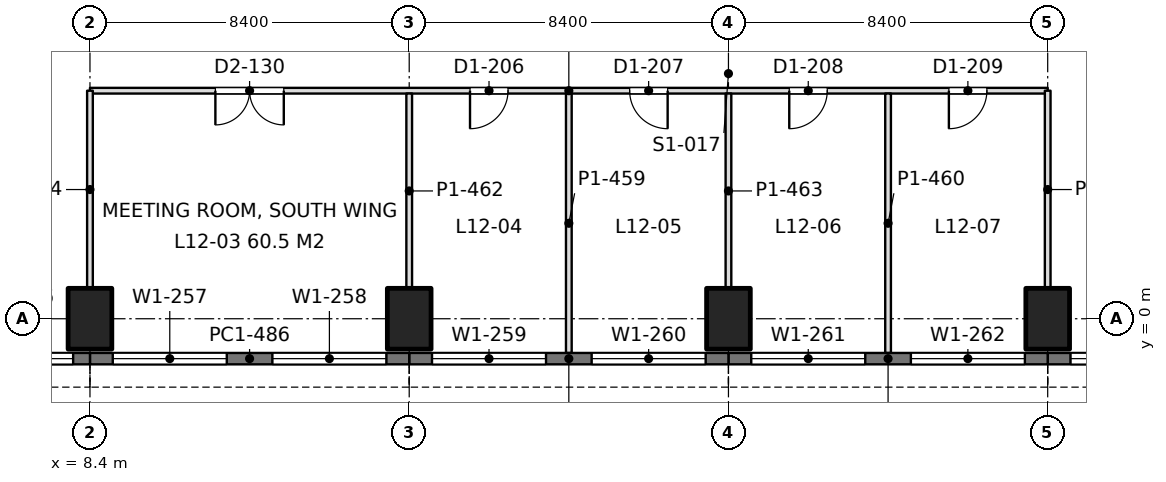
"""IFC4 building model, lengths in metres.
Left out: names, types, materials, properties, quantities, classifications, styles, units other than length and angle.
Written with IfcOpenShell. Run it as: python <this file> out.ifc"""

import sys

from ifc_helpers import new_model, si_unit, direction, frame, frame_2d, origin, origin_2d, place, context, subcontext, project, spatial, rectangle, extrude, element, fill, save


model = new_model("IFC4")
c1 = context("Model", 3, precision=1e-05, world=origin(), true_north=direction((0.0, 1.0)))
c2 = subcontext(c1, "Body", "Model", "MODEL_VIEW")
j1 = project(units=[si_unit("LENGTHUNIT", "METRE"), si_unit("PLANEANGLEUNIT", "RADIAN")], contexts=[c1])
p1 = place(None, origin())
s1 = spatial("IfcSite", under=j1, at=p1, CompositionType="ELEMENT")
p2 = place(p1, origin())
s2 = spatial("IfcBuilding", under=s1, at=p2, CompositionType="ELEMENT")
p3 = place(p2, frame((0.0, 0.0, 54.9)))
s3 = spatial("IfcBuildingStorey", under=s2, at=p3, CompositionType="ELEMENT", Elevation=54.9)
for number, where, z_axis, x_axis in (
    (1, (8.4, 0.0, 0.0), (0.0, 0.0, 1.0), (1.0, 0.0, 0.0)),
    (2, (16.8, 0.0, 0.0), (0.0, 0.0, 1.0), (1.0, 0.0, 0.0)),
    (3, (25.2, 0.0, 0.0), (0.0, 0.0, 1.0), (1.0, 0.0, 0.0)),
    (4, (33.6, 0.0, 0.0), (0.0, 0.0, 1.0), (1.0, 0.0, 0.0)),
):
    element("IfcColumn", number, at=place(p3, frame(where, z_axis=z_axis, x_axis=x_axis)), inside=s3, PredefinedType="COLUMN", context=c2, shape_type="SweptSolid", body=[
        extrude(rectangle(XDim=1.15, YDim=1.6, at=origin_2d()), origin(), (0.0, 0.0, 1.0), 4.5),
    ])
p4 = place(p3, frame((42.0, -1.05, 0.0), z_axis=(0.0, 0.0, 1.0), x_axis=(-1.0, 0.0, 0.0)))
e5 = element("IfcWall", 5, at=p4, inside=s3, PredefinedType="SOLIDWALL", context=c2, shape_type="SweptSolid", body=[
    extrude(rectangle(XDim=8.4, YDim=0.3, at=frame_2d((4.2, 0.0))), origin(), (0.0, 0.0, 1.0), 4.34),
])
p5 = place(p4, frame((0.6, 0.0, 0.9)))
e6 = element("IfcOpeningElement", 6, at=p5, cuts=e5, PredefinedType="OPENING", context=c2, shape_type="SweptSolid", body=[
    extrude(rectangle(XDim=3.0, YDim=1.9, at=frame_2d((1.5, 0.95))), frame((0.0, 0.16, 0.0), z_axis=(0.0, -1.0, 0.0), x_axis=(1.0, 0.0, 0.0)), (0.0, 0.0, 1.0), 0.32),
])
p6 = place(p4, frame((4.8, 0.0, 0.9)))
e7 = element("IfcOpeningElement", 7, at=p6, cuts=e5, PredefinedType="OPENING", context=c2, shape_type="SweptSolid", body=[
    extrude(rectangle(XDim=3.0, YDim=1.9, at=frame_2d((1.5, 0.95))), frame((0.0, 0.16, 0.0), z_axis=(0.0, -1.0, 0.0), x_axis=(1.0, 0.0, 0.0)), (0.0, 0.0, 1.0), 0.32),
])
p7 = place(p3, frame((33.6, -1.05, 0.0), z_axis=(0.0, 0.0, 1.0), x_axis=(-1.0, 0.0, 0.0)))
e8 = element("IfcWall", 8, at=p7, inside=s3, PredefinedType="SOLIDWALL", context=c2, shape_type="SweptSolid", body=[
    extrude(rectangle(XDim=8.4, YDim=0.3, at=frame_2d((4.2, 0.0))), origin(), (0.0, 0.0, 1.0), 4.34),
])
p8 = place(p7, frame((0.6, 0.0, 0.9)))
e9 = element("IfcOpeningElement", 9, at=p8, cuts=e8, PredefinedType="OPENING", context=c2, shape_type="SweptSolid", body=[
    extrude(rectangle(XDim=3.0, YDim=1.9, at=frame_2d((1.5, 0.95))), frame((0.0, 0.16, 0.0), z_axis=(0.0, -1.0, 0.0), x_axis=(1.0, 0.0, 0.0)), (0.0, 0.0, 1.0), 0.32),
])
p9 = place(p7, frame((4.8, 0.0, 0.9)))
e10 = element("IfcOpeningElement", 10, at=p9, cuts=e8, PredefinedType="OPENING", context=c2, shape_type="SweptSolid", body=[
    extrude(rectangle(XDim=3.0, YDim=1.9, at=frame_2d((1.5, 0.95))), frame((0.0, 0.16, 0.0), z_axis=(0.0, -1.0, 0.0), x_axis=(1.0, 0.0, 0.0)), (0.0, 0.0, 1.0), 0.32),
])
p10 = place(p3, frame((25.2, -1.05, 0.0), z_axis=(0.0, 0.0, 1.0), x_axis=(-1.0, 0.0, 0.0)))
e11 = element("IfcWall", 11, at=p10, inside=s3, PredefinedType="SOLIDWALL", context=c2, shape_type="SweptSolid", body=[
    extrude(rectangle(XDim=8.4, YDim=0.3, at=frame_2d((4.2, 0.0))), origin(), (0.0, 0.0, 1.0), 4.34),
])
p11 = place(p10, frame((0.6, 0.0, 0.9)))
e12 = element("IfcOpeningElement", 12, at=p11, cuts=e11, PredefinedType="OPENING", context=c2, shape_type="SweptSolid", body=[
    extrude(rectangle(XDim=3.0, YDim=1.9, at=frame_2d((1.5, 0.95))), frame((0.0, 0.16, 0.0), z_axis=(0.0, -1.0, 0.0), x_axis=(1.0, 0.0, 0.0)), (0.0, 0.0, 1.0), 0.32),
])
p12 = place(p10, frame((4.8, 0.0, 0.9)))
e13 = element("IfcOpeningElement", 13, at=p12, cuts=e11, PredefinedType="OPENING", context=c2, shape_type="SweptSolid", body=[
    extrude(rectangle(XDim=3.0, YDim=1.9, at=frame_2d((1.5, 0.95))), frame((0.0, 0.16, 0.0), z_axis=(0.0, -1.0, 0.0), x_axis=(1.0, 0.0, 0.0)), (0.0, 0.0, 1.0), 0.32),
])
p13 = place(p3, frame((16.8, -1.05, 0.0), z_axis=(0.0, 0.0, 1.0), x_axis=(-1.0, 0.0, 0.0)))
e14 = element("IfcWall", 14, at=p13, inside=s3, PredefinedType="SOLIDWALL", context=c2, shape_type="SweptSolid", body=[
    extrude(rectangle(XDim=8.4, YDim=0.3, at=frame_2d((4.2, 0.0))), origin(), (0.0, 0.0, 1.0), 4.34),
])
p14 = place(p13, frame((0.6, 0.0, 0.9)))
e15 = element("IfcOpeningElement", 15, at=p14, cuts=e14, PredefinedType="OPENING", context=c2, shape_type="SweptSolid", body=[
    extrude(rectangle(XDim=3.0, YDim=1.9, at=frame_2d((1.5, 0.95))), frame((0.0, 0.16, 0.0), z_axis=(0.0, -1.0, 0.0), x_axis=(1.0, 0.0, 0.0)), (0.0, 0.0, 1.0), 0.32),
])
p15 = place(p13, frame((4.8, 0.0, 0.9)))
e16 = element("IfcOpeningElement", 16, at=p15, cuts=e14, PredefinedType="OPENING", context=c2, shape_type="SweptSolid", body=[
    extrude(rectangle(XDim=3.0, YDim=1.9, at=frame_2d((1.5, 0.95))), frame((0.0, 0.16, 0.0), z_axis=(0.0, -1.0, 0.0), x_axis=(1.0, 0.0, 0.0)), (0.0, 0.0, 1.0), 0.32),
])
p16 = place(p3, frame((8.4, -1.05, 0.0), z_axis=(0.0, 0.0, 1.0), x_axis=(-1.0, 0.0, 0.0)))
e17 = element("IfcWall", 17, at=p16, inside=s3, PredefinedType="SOLIDWALL", context=c2, shape_type="SweptSolid", body=[
    extrude(rectangle(XDim=8.085, YDim=0.3, at=frame_2d((4.042, 0.0))), origin(), (0.0, 0.0, 1.0), 4.34),
])
p17 = place(p16, frame((0.443, 0.0, 0.9)))
e18 = element("IfcOpeningElement", 18, at=p17, cuts=e17, PredefinedType="OPENING", context=c2, shape_type="SweptSolid", body=[
    extrude(rectangle(XDim=3.0, YDim=1.9, at=frame_2d((1.5, 0.95))), frame((0.0, 0.16, 0.0), z_axis=(0.0, -1.0, 0.0), x_axis=(1.0, 0.0, 0.0)), (0.0, 0.0, 1.0), 0.32),
])
p18 = place(p16, frame((4.643, 0.0, 0.9)))
e19 = element("IfcOpeningElement", 19, at=p18, cuts=e17, PredefinedType="OPENING", context=c2, shape_type="SweptSolid", body=[
    extrude(rectangle(XDim=3.0, YDim=1.9, at=frame_2d((1.5, 0.95))), frame((0.0, 0.16, 0.0), z_axis=(0.0, -1.0, 0.0), x_axis=(1.0, 0.0, 0.0)), (0.0, 0.0, 1.0), 0.32),
])
p19 = place(p3, frame((8.4, 6.0, 0.0), z_axis=(0.0, 0.0, 1.0), x_axis=(1.0, 0.0, 0.0)))
e20 = element("IfcWall", 20, at=p19, inside=s3, PredefinedType="PARTITIONING", context=c2, shape_type="SweptSolid", body=[
    extrude(rectangle(XDim=25.2, YDim=0.15, at=frame_2d((12.6, 0.0))), origin(), (0.0, 0.0, 1.0), 3.74),
])
p20 = place(p19, frame((3.3, 0.0, 0.0)))
e21 = element("IfcOpeningElement", 21, at=p20, cuts=e20, PredefinedType="OPENING", context=c2, shape_type="SweptSolid", body=[
    extrude(rectangle(XDim=1.8, YDim=2.2, at=frame_2d((0.9, 1.1))), frame((0.0, 0.085, 0.0), z_axis=(0.0, -1.0, 0.0), x_axis=(1.0, 0.0, 0.0)), (0.0, 0.0, 1.0), 0.17),
])
p21 = place(p19, frame((10.0, 0.0, 0.0)))
e22 = element("IfcOpeningElement", 22, at=p21, cuts=e20, PredefinedType="OPENING", context=c2, shape_type="SweptSolid", body=[
    extrude(rectangle(XDim=1.0, YDim=2.2, at=frame_2d((0.5, 1.1))), frame((0.0, 0.085, 0.0), z_axis=(0.0, -1.0, 0.0), x_axis=(1.0, 0.0, 0.0)), (0.0, 0.0, 1.0), 0.17),
])
p22 = place(p19, frame((14.2, 0.0, 0.0)))
e23 = element("IfcOpeningElement", 23, at=p22, cuts=e20, PredefinedType="OPENING", context=c2, shape_type="SweptSolid", body=[
    extrude(rectangle(XDim=1.0, YDim=2.2, at=frame_2d((0.5, 1.1))), frame((0.0, 0.085, 0.0), z_axis=(0.0, -1.0, 0.0), x_axis=(1.0, 0.0, 0.0)), (0.0, 0.0, 1.0), 0.17),
])
p23 = place(p19, frame((18.4, 0.0, 0.0)))
e24 = element("IfcOpeningElement", 24, at=p23, cuts=e20, PredefinedType="OPENING", context=c2, shape_type="SweptSolid", body=[
    extrude(rectangle(XDim=1.0, YDim=2.2, at=frame_2d((0.5, 1.1))), frame((0.0, 0.085, 0.0), z_axis=(0.0, -1.0, 0.0), x_axis=(1.0, 0.0, 0.0)), (0.0, 0.0, 1.0), 0.17),
])
p24 = place(p19, frame((22.6, 0.0, 0.0)))
e25 = element("IfcOpeningElement", 25, at=p24, cuts=e20, PredefinedType="OPENING", context=c2, shape_type="SweptSolid", body=[
    extrude(rectangle(XDim=1.0, YDim=2.2, at=frame_2d((0.5, 1.1))), frame((0.0, 0.085, 0.0), z_axis=(0.0, -1.0, 0.0), x_axis=(1.0, 0.0, 0.0)), (0.0, 0.0, 1.0), 0.17),
])
p25 = place(p3, frame((8.4, 0.799, 0.0), z_axis=(0.0, 0.0, 1.0), x_axis=(0.0, 1.0, 0.0)))
e26 = element("IfcWall", 26, at=p25, inside=s3, PredefinedType="PARTITIONING", context=c2, shape_type="SweptSolid", body=[
    extrude(rectangle(XDim=5.201, YDim=0.15, at=frame_2d((2.601, 0.0))), origin(), (0.0, 0.0, 1.0), 3.74),
])
p26 = place(p3, frame((16.8, 0.799, 0.0), z_axis=(0.0, 0.0, 1.0), x_axis=(0.0, 1.0, 0.0)))
e27 = element("IfcWall", 27, at=p26, inside=s3, PredefinedType="PARTITIONING", context=c2, shape_type="SweptSolid", body=[
    extrude(rectangle(XDim=5.127, YDim=0.15, at=frame_2d((2.563, 0.0))), origin(), (0.0, 0.0, 1.0), 3.74),
])
p27 = place(p3, frame((21.0, -0.902, 0.0), z_axis=(0.0, 0.0, 1.0), x_axis=(0.0, 1.0, 0.0)))
e28 = element("IfcWall", 28, at=p27, inside=s3, PredefinedType="PARTITIONING", context=c2, shape_type="SweptSolid", body=[
    extrude(rectangle(XDim=6.828, YDim=0.15, at=frame_2d((3.414, 0.0))), origin(), (0.0, 0.0, 1.0), 3.84),
])
p28 = place(p3, frame((25.2, 0.799, 0.0), z_axis=(0.0, 0.0, 1.0), x_axis=(0.0, 1.0, 0.0)))
e29 = element("IfcWall", 29, at=p28, inside=s3, PredefinedType="PARTITIONING", context=c2, shape_type="SweptSolid", body=[
    extrude(rectangle(XDim=5.127, YDim=0.15, at=frame_2d((2.563, 0.0))), origin(), (0.0, 0.0, 1.0), 3.74),
])
p29 = place(p3, frame((29.4, -0.902, 0.0), z_axis=(0.0, 0.0, 1.0), x_axis=(0.0, 1.0, 0.0)))
e30 = element("IfcWall", 30, at=p29, inside=s3, PredefinedType="PARTITIONING", context=c2, shape_type="SweptSolid", body=[
    extrude(rectangle(XDim=6.828, YDim=0.15, at=frame_2d((3.414, 0.0))), origin(), (0.0, 0.0, 1.0), 3.84),
])
p30 = place(p3, frame((33.6, 0.799, 0.0), z_axis=(0.0, 0.0, 1.0), x_axis=(0.0, 1.0, 0.0)))
e31 = element("IfcWall", 31, at=p30, inside=s3, PredefinedType="PARTITIONING", context=c2, shape_type="SweptSolid", body=[
    extrude(rectangle(XDim=5.201, YDim=0.15, at=frame_2d((2.601, 0.0))), origin(), (0.0, 0.0, 1.0), 3.74),
])
p31 = place(p6, origin())
e32 = element("IfcWindow", 32, at=p31, inside=s3, PartitioningType="SINGLE_PANEL", PredefinedType="WINDOW", context=c2, shape_type="SweptSolid", body=[
    extrude(rectangle(XDim=3.0, YDim=1.9, at=frame_2d((1.5, 0.95))), frame((0.0, 0.03, 0.0), z_axis=(0.0, -1.0, 0.0), x_axis=(1.0, 0.0, 0.0)), (0.0, 0.0, 1.0), 0.06),
])
fill(e7, e32)
p32 = place(p8, origin())
e33 = element("IfcWindow", 33, at=p32, inside=s3, PartitioningType="SINGLE_PANEL", PredefinedType="WINDOW", context=c2, shape_type="SweptSolid", body=[
    extrude(rectangle(XDim=3.0, YDim=1.9, at=frame_2d((1.5, 0.95))), frame((0.0, 0.03, 0.0), z_axis=(0.0, -1.0, 0.0), x_axis=(1.0, 0.0, 0.0)), (0.0, 0.0, 1.0), 0.06),
])
fill(e9, e33)
p33 = place(p9, origin())
e34 = element("IfcWindow", 34, at=p33, inside=s3, PartitioningType="SINGLE_PANEL", PredefinedType="WINDOW", context=c2, shape_type="SweptSolid", body=[
    extrude(rectangle(XDim=3.0, YDim=1.9, at=frame_2d((1.5, 0.95))), frame((0.0, 0.03, 0.0), z_axis=(0.0, -1.0, 0.0), x_axis=(1.0, 0.0, 0.0)), (0.0, 0.0, 1.0), 0.06),
])
fill(e10, e34)
p34 = place(p11, origin())
e35 = element("IfcWindow", 35, at=p34, inside=s3, PartitioningType="SINGLE_PANEL", PredefinedType="WINDOW", context=c2, shape_type="SweptSolid", body=[
    extrude(rectangle(XDim=3.0, YDim=1.9, at=frame_2d((1.5, 0.95))), frame((0.0, 0.03, 0.0), z_axis=(0.0, -1.0, 0.0), x_axis=(1.0, 0.0, 0.0)), (0.0, 0.0, 1.0), 0.06),
])
fill(e12, e35)
p35 = place(p12, origin())
e36 = element("IfcWindow", 36, at=p35, inside=s3, PartitioningType="SINGLE_PANEL", PredefinedType="WINDOW", context=c2, shape_type="SweptSolid", body=[
    extrude(rectangle(XDim=3.0, YDim=1.9, at=frame_2d((1.5, 0.95))), frame((0.0, 0.03, 0.0), z_axis=(0.0, -1.0, 0.0), x_axis=(1.0, 0.0, 0.0)), (0.0, 0.0, 1.0), 0.06),
])
fill(e13, e36)
p36 = place(p14, origin())
e37 = element("IfcWindow", 37, at=p36, inside=s3, PartitioningType="SINGLE_PANEL", PredefinedType="WINDOW", context=c2, shape_type="SweptSolid", body=[
    extrude(rectangle(XDim=3.0, YDim=1.9, at=frame_2d((1.5, 0.95))), frame((0.0, 0.03, 0.0), z_axis=(0.0, -1.0, 0.0), x_axis=(1.0, 0.0, 0.0)), (0.0, 0.0, 1.0), 0.06),
])
fill(e15, e37)
p37 = place(p15, origin())
e38 = element("IfcWindow", 38, at=p37, inside=s3, PartitioningType="SINGLE_PANEL", PredefinedType="WINDOW", context=c2, shape_type="SweptSolid", body=[
    extrude(rectangle(XDim=3.0, YDim=1.9, at=frame_2d((1.5, 0.95))), frame((0.0, 0.03, 0.0), z_axis=(0.0, -1.0, 0.0), x_axis=(1.0, 0.0, 0.0)), (0.0, 0.0, 1.0), 0.06),
])
fill(e16, e38)
p38 = place(p17, origin())
e39 = element("IfcWindow", 39, at=p38, inside=s3, PartitioningType="SINGLE_PANEL", PredefinedType="WINDOW", context=c2, shape_type="SweptSolid", body=[
    extrude(rectangle(XDim=3.0, YDim=1.9, at=frame_2d((1.5, 0.95))), frame((0.0, 0.03, 0.0), z_axis=(0.0, -1.0, 0.0), x_axis=(1.0, 0.0, 0.0)), (0.0, 0.0, 1.0), 0.06),
])
fill(e18, e39)
p39 = place(p20, frame((1.8, 0.0, 0.0), z_axis=(0.0, 0.0, 1.0), x_axis=(-1.0, 0.0, 0.0)))
e40 = element("IfcDoor", 40, at=p39, inside=s3, OperationType="DOUBLE_DOOR_SINGLE_SWING", PredefinedType="DOOR", context=c2, shape_type="SweptSolid", body=[
    extrude(rectangle(XDim=1.8, YDim=2.2, at=frame_2d((0.9, 1.1))), frame((0.0, 0.025, 0.0), z_axis=(0.0, -1.0, 0.0), x_axis=(1.0, 0.0, 0.0)), (0.0, 0.0, 1.0), 0.05),
])
fill(e21, e40)
p40 = place(p21, frame((1.0, 0.0, 0.0), z_axis=(0.0, 0.0, 1.0), x_axis=(-1.0, 0.0, 0.0)))
e41 = element("IfcDoor", 41, at=p40, inside=s3, OperationType="SINGLE_SWING_RIGHT", PredefinedType="DOOR", context=c2, shape_type="SweptSolid", body=[
    extrude(rectangle(XDim=1.0, YDim=2.2, at=frame_2d((0.5, 1.1))), frame((0.0, 0.025, 0.0), z_axis=(0.0, -1.0, 0.0), x_axis=(1.0, 0.0, 0.0)), (0.0, 0.0, 1.0), 0.05),
])
fill(e22, e41)
p41 = place(p22, frame((1.0, 0.0, 0.0), z_axis=(0.0, 0.0, 1.0), x_axis=(-1.0, 0.0, 0.0)))
e42 = element("IfcDoor", 42, at=p41, inside=s3, OperationType="SINGLE_SWING_LEFT", PredefinedType="DOOR", context=c2, shape_type="SweptSolid", body=[
    extrude(rectangle(XDim=1.0, YDim=2.2, at=frame_2d((0.5, 1.1))), frame((0.0, 0.025, 0.0), z_axis=(0.0, -1.0, 0.0), x_axis=(1.0, 0.0, 0.0)), (0.0, 0.0, 1.0), 0.05),
])
fill(e23, e42)
p42 = place(p23, frame((1.0, 0.0, 0.0), z_axis=(0.0, 0.0, 1.0), x_axis=(-1.0, 0.0, 0.0)))
e43 = element("IfcDoor", 43, at=p42, inside=s3, OperationType="SINGLE_SWING_RIGHT", PredefinedType="DOOR", context=c2, shape_type="SweptSolid", body=[
    extrude(rectangle(XDim=1.0, YDim=2.2, at=frame_2d((0.5, 1.1))), frame((0.0, 0.025, 0.0), z_axis=(0.0, -1.0, 0.0), x_axis=(1.0, 0.0, 0.0)), (0.0, 0.0, 1.0), 0.05),
])
fill(e24, e43)
p43 = place(p24, frame((1.0, 0.0, 0.0), z_axis=(0.0, 0.0, 1.0), x_axis=(-1.0, 0.0, 0.0)))
e44 = element("IfcDoor", 44, at=p43, inside=s3, OperationType="SINGLE_SWING_RIGHT", PredefinedType="DOOR", context=c2, shape_type="SweptSolid", body=[
    extrude(rectangle(XDim=1.0, YDim=2.2, at=frame_2d((0.5, 1.1))), frame((0.0, 0.025, 0.0), z_axis=(0.0, -1.0, 0.0), x_axis=(1.0, 0.0, 0.0)), (0.0, 0.0, 1.0), 0.05),
])
fill(e25, e44)
save(model, sys.argv[1])
